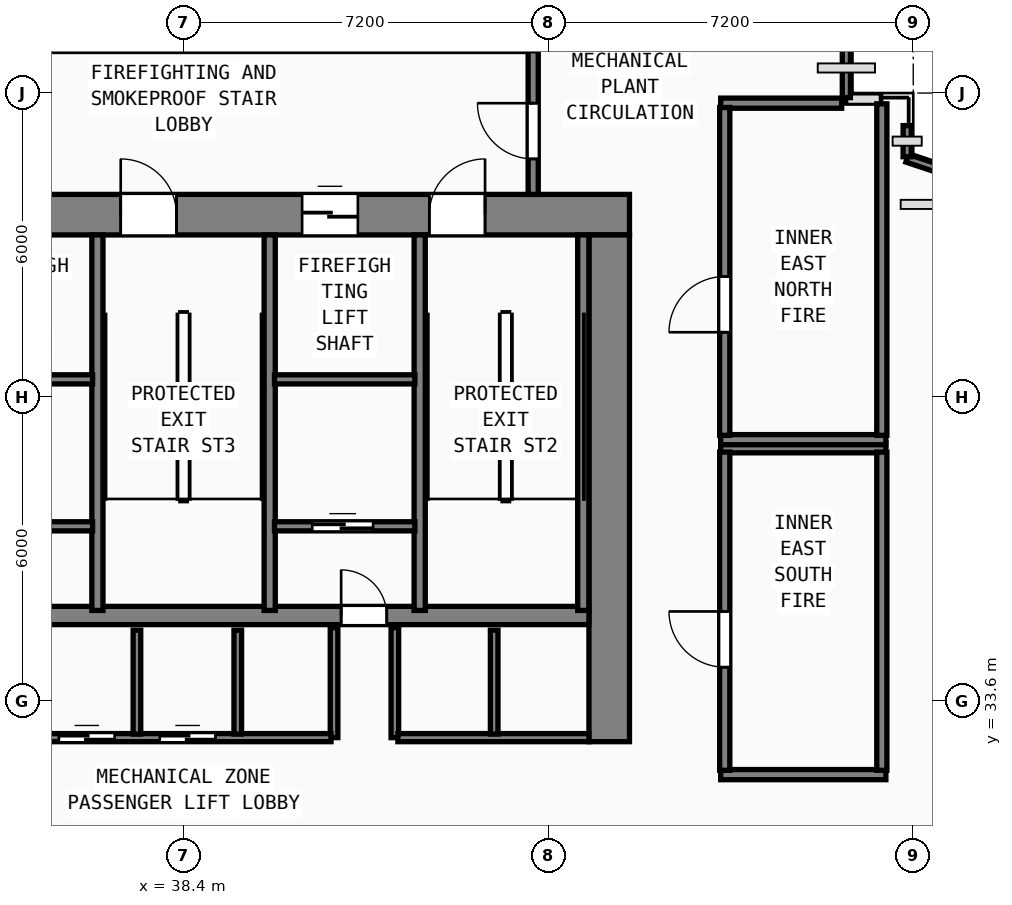
"""IFC4 building model, lengths in metres.
Left out: names, types, materials, properties, quantities, classifications, styles, units other than length and angle.
Written with IfcOpenShell. Run it as: python <this file> out.ifc"""

import sys

from ifc_helpers import new_model, si_unit, direction, frame, frame_2d, origin, origin_2d, place, context, subcontext, project, spatial, rectangle, hollow_rectangle, extrude, element, fill, save


model = new_model("IFC4")
c1 = context("Model", 3, precision=1e-05, world=origin(), true_north=direction((0.0, 1.0)))
c2 = subcontext(c1, "Body", "Model", "MODEL_VIEW")
j1 = project(units=[si_unit("LENGTHUNIT", "METRE"), si_unit("PLANEANGLEUNIT", "RADIAN")], contexts=[c1])
p1 = place(None, origin())
s1 = spatial("IfcSite", under=j1, at=p1, CompositionType="ELEMENT")
p2 = place(p1, origin())
s2 = spatial("IfcBuilding", under=s1, at=p2, CompositionType="ELEMENT")
p3 = place(p2, frame((0.0, 0.0, 43.0)))
s3 = spatial("IfcBuildingStorey", under=s2, at=p3, CompositionType="ELEMENT", Elevation=43.0)
p4 = place(p3, frame((29.6, 43.2, 0.0), z_axis=(0.0, 0.0, 1.0), x_axis=(1.0, 0.0, 0.0)))
e1 = element("IfcWall", 1, at=p4, inside=s3, PredefinedType="SHEAR", context=c2, shape_type="SweptSolid", body=[
    extrude(rectangle(XDim=17.6, YDim=0.8, at=frame_2d((8.8, 0.0))), origin(), (0.0, 0.0, 1.0), 4.4),
])
p5 = place(p4, frame((2.45, 0.0, 0.0)))
e2 = element("IfcOpeningElement", 2, at=p5, cuts=e1, PredefinedType="OPENING", context=c2, shape_type="SweptSolid", body=[
    extrude(rectangle(XDim=1.1, YDim=2.15, at=frame_2d((0.55, 1.075))), frame((0.0, 0.41, 0.0), z_axis=(0.0, -1.0, 0.0), x_axis=(1.0, 0.0, 0.0)), (0.0, 0.0, 1.0), 0.82),
])
p6 = place(p4, frame((7.56, 0.0, 0.0)))
e3 = element("IfcOpeningElement", 3, at=p6, cuts=e1, PredefinedType="OPENING", context=c2, shape_type="SweptSolid", body=[
    extrude(rectangle(XDim=1.1, YDim=2.15, at=frame_2d((0.55, 1.075))), frame((0.0, 0.41, 0.0), z_axis=(0.0, -1.0, 0.0), x_axis=(1.0, 0.0, 0.0)), (0.0, 0.0, 1.0), 0.82),
])
p7 = place(p4, frame((13.65, 0.0, 0.0)))
e4 = element("IfcOpeningElement", 4, at=p7, cuts=e1, PredefinedType="OPENING", context=c2, shape_type="SweptSolid", body=[
    extrude(rectangle(XDim=1.1, YDim=2.15, at=frame_2d((0.55, 1.075))), frame((0.0, 0.41, 0.0), z_axis=(0.0, -1.0, 0.0), x_axis=(1.0, 0.0, 0.0)), (0.0, 0.0, 1.0), 0.82),
])
p8 = place(p4, frame((4.78, 0.0, 0.0)))
e5 = element("IfcOpeningElement", 5, at=p8, cuts=e1, PredefinedType="OPENING", context=c2, shape_type="SweptSolid", body=[
    extrude(rectangle(XDim=1.1, YDim=2.2, at=frame_2d((0.55, 1.1))), frame((0.0, 0.41, 0.0), z_axis=(0.0, -1.0, 0.0), x_axis=(1.0, 0.0, 0.0)), (0.0, 0.0, 1.0), 0.82),
])
p9 = place(p4, frame((11.14, 0.0, 0.0)))
e6 = element("IfcOpeningElement", 6, at=p9, cuts=e1, PredefinedType="OPENING", context=c2, shape_type="SweptSolid", body=[
    extrude(rectangle(XDim=1.1, YDim=2.2, at=frame_2d((0.55, 1.1))), frame((0.0, 0.41, 0.0), z_axis=(0.0, -1.0, 0.0), x_axis=(1.0, 0.0, 0.0)), (0.0, 0.0, 1.0), 0.82),
])
p10 = place(p3, frame((46.8, 32.8, 0.0), z_axis=(0.0, 0.0, 1.0), x_axis=(0.0, 1.0, 0.0)))
e7 = element("IfcWall", 7, at=p10, inside=s3, PredefinedType="SHEAR", context=c2, shape_type="SweptSolid", body=[
    extrude(rectangle(XDim=10.0, YDim=0.8, at=frame_2d((5.0, 0.0))), origin(), (0.0, 0.0, 1.0), 4.4),
])
p11 = place(p3, frame((30.4, 35.29, 0.0), z_axis=(0.0, 0.0, 1.0), x_axis=(1.0, 0.0, 0.0)))
e8 = element("IfcWall", 8, at=p11, inside=s3, PredefinedType="SHEAR", context=c2, shape_type="SweptSolid", body=[
    extrude(rectangle(XDim=16.0, YDim=0.36, at=frame_2d((8.0, 0.0))), origin(), (0.0, 0.0, 1.0), 4.4),
])
p12 = place(p11, frame((4.95, 0.0, 0.0), z_axis=(0.0, 0.0, 1.0), x_axis=(-1.0, 0.0, 0.0)))
e9 = element("IfcOpeningElement", 9, at=p12, cuts=e8, PredefinedType="OPENING", context=c2, shape_type="SweptSolid", body=[
    extrude(rectangle(XDim=0.9, YDim=2.1, at=frame_2d((0.45, 1.05))), frame((0.0, 0.19, 0.0), z_axis=(0.0, -1.0, 0.0), x_axis=(1.0, 0.0, 0.0)), (0.0, 0.0, 1.0), 0.38),
])
p13 = place(p11, frame((12.01, 0.0, 0.0), z_axis=(0.0, 0.0, 1.0), x_axis=(-1.0, 0.0, 0.0)))
e10 = element("IfcOpeningElement", 10, at=p13, cuts=e8, PredefinedType="OPENING", context=c2, shape_type="SweptSolid", body=[
    extrude(rectangle(XDim=0.9, YDim=2.1, at=frame_2d((0.45, 1.05))), frame((0.0, 0.19, 0.0), z_axis=(0.0, -1.0, 0.0), x_axis=(1.0, 0.0, 0.0)), (0.0, 0.0, 1.0), 0.38),
])
for number, where, z_axis, x_axis in (
    (11, (36.7, 35.39, 0.0), (0.0, 0.0, 1.0), (0.0, 1.0, 0.0)),
    (12, (40.1, 35.39, 0.0), (0.0, 0.0, 1.0), (0.0, 1.0, 0.0)),
    (13, (43.06, 35.39, 0.0), (0.0, 0.0, 1.0), (0.0, 1.0, 0.0)),
    (14, (46.288, 35.39, 0.0), (0.0, 0.0, 1.0), (0.0, 1.0, 0.0)),
):
    element("IfcWall", number, at=place(p3, frame(where, z_axis=z_axis, x_axis=x_axis)), inside=s3, PredefinedType="SHEAR", context=c2, shape_type="SweptSolid", body=[
        extrude(rectangle(XDim=7.41, YDim=0.22, at=frame_2d((3.705, 0.0))), origin(), (0.0, 0.0, 1.0), 4.4),
    ])
for number, where, z_axis, x_axis in (
    (15, (52.8, 33.6, 0.0), (0.0, 0.0, 1.0), (1.0, 0.0, 0.0)),
    (16, (52.8, 45.6, 0.0), (0.0, 0.0, 1.0), (1.0, 0.0, 0.0)),
):
    element("IfcColumn", number, at=place(p3, frame(where, z_axis=z_axis, x_axis=x_axis)), inside=s3, PredefinedType="COLUMN", context=c2, shape_type="SweptSolid", body=[
        extrude(hollow_rectangle(XDim=1.3, YDim=1.3, WallThickness=0.048, at=origin_2d()), origin(), (0.0, 0.0, 1.0), 4.6),
    ])
p14 = place(p3, frame((52.8, 39.6, 0.0), z_axis=(0.0, 0.0, 1.0), x_axis=(1.0, 0.0, 0.0)))
e17 = element("IfcColumn", 17, at=p14, inside=s3, PredefinedType="COLUMN", context=c2, shape_type="SweptSolid", body=[
    extrude(hollow_rectangle(XDim=1.0, YDim=1.0, WallThickness=0.038, at=origin_2d()), origin(), (0.0, 0.0, 1.0), 4.6),
])
p15 = place(p3, frame((58.145, 42.492, 0.0), z_axis=(0.0, 0.0, 1.0), x_axis=(-0.948683298051, 0.316227766017, 0.0)))
e18 = element("IfcWall", 18, at=p15, inside=s3, PredefinedType="PARAPET", context=c2, shape_type="SweptSolid", body=[
    extrude(rectangle(XDim=5.76, YDim=0.16, at=frame_2d((2.88, 0.0))), origin(), (0.0, 0.0, 1.0), 1.15),
])
p16 = place(p3, frame((52.68, 44.344, 0.0), z_axis=(0.0, 0.0, 1.0), x_axis=(0.0, 1.0, 0.0)))
e19 = element("IfcWall", 19, at=p16, inside=s3, PredefinedType="PARAPET", context=c2, shape_type="SweptSolid", body=[
    extrude(rectangle(XDim=0.615, YDim=0.16, at=frame_2d((0.307, 0.0))), origin(), (0.0, 0.0, 1.0), 1.15),
])
p17 = place(p3, frame((52.158, 45.48, 0.0), z_axis=(0.0, 0.0, 1.0), x_axis=(-1.0, 0.0, 0.0)))
e20 = element("IfcWall", 20, at=p17, inside=s3, PredefinedType="PARAPET", context=c2, shape_type="SweptSolid", body=[
    extrude(rectangle(XDim=0.678, YDim=0.16, at=frame_2d((0.339, 0.0))), origin(), (0.0, 0.0, 1.0), 1.15),
])
p18 = place(p3, frame((51.48, 45.51, 0.0), z_axis=(0.0, 0.0, 1.0), x_axis=(0.0, 1.0, 0.0)))
e21 = element("IfcWall", 21, at=p18, inside=s3, PredefinedType="PARAPET", context=c2, shape_type="SweptSolid", body=[
    extrude(rectangle(XDim=1.17, YDim=0.16, at=frame_2d((0.585, 0.0))), origin(), (0.0, 0.0, 1.0), 1.15),
])
p19 = place(p3, frame((45.3, 43.6, 0.0), z_axis=(0.0, 0.0, 1.0), x_axis=(0.0, 1.0, 0.0)))
e22 = element("IfcWall", 22, at=p19, inside=s3, PredefinedType="SOLIDWALL", context=c2, shape_type="SweptSolid", body=[
    extrude(rectangle(XDim=2.835, YDim=0.2, at=frame_2d((1.417, 0.0))), origin(), (0.0, 0.0, 1.0), 4.4),
])
p20 = place(p19, frame((0.7, 0.0, 0.0)))
e23 = element("IfcOpeningElement", 23, at=p20, cuts=e22, PredefinedType="OPENING", context=c2, shape_type="SweptSolid", body=[
    extrude(rectangle(XDim=1.1, YDim=2.15, at=frame_2d((0.55, 1.075))), frame((0.0, 0.11, 0.0), z_axis=(0.0, -1.0, 0.0), x_axis=(1.0, 0.0, 0.0)), (0.0, 0.0, 1.0), 0.22),
])
for number, where, z_axis, x_axis in (
    (24, (33.835, 39.95, 0.0), (0.0, 0.0, 1.0), (1.0, 0.0, 0.0)),
    (25, (40.195, 39.95, 0.0), (0.0, 0.0, 1.0), (1.0, 0.0, 0.0)),
):
    element("IfcWall", number, at=place(p3, frame(where, z_axis=z_axis, x_axis=x_axis)), inside=s3, PredefinedType="SOLIDWALL", context=c2, shape_type="SweptSolid", body=[
        extrude(rectangle(XDim=2.77, YDim=0.18, at=frame_2d((1.385, 0.0))), origin(), (0.0, 0.0, 1.0), 4.4),
    ])
p21 = place(p3, frame((33.835, 37.05, 0.0), z_axis=(0.0, 0.0, 1.0), x_axis=(1.0, 0.0, 0.0)))
e26 = element("IfcWall", 26, at=p21, inside=s3, PredefinedType="SOLIDWALL", context=c2, shape_type="SweptSolid", body=[
    extrude(rectangle(XDim=2.77, YDim=0.18, at=frame_2d((1.385, 0.0))), origin(), (0.0, 0.0, 1.0), 4.4),
])
p22 = place(p21, frame((1.945, 0.0, 0.0), z_axis=(0.0, 0.0, 1.0), x_axis=(-1.0, 0.0, 0.0)))
e27 = element("IfcOpeningElement", 27, at=p22, cuts=e26, PredefinedType="OPENING", context=c2, shape_type="SweptSolid", body=[
    extrude(rectangle(XDim=1.2, YDim=2.2, at=frame_2d((0.6, 1.1))), frame((0.0, 0.1, 0.0), z_axis=(0.0, -1.0, 0.0), x_axis=(1.0, 0.0, 0.0)), (0.0, 0.0, 1.0), 0.2),
])
p23 = place(p3, frame((40.195, 37.05, 0.0), z_axis=(0.0, 0.0, 1.0), x_axis=(1.0, 0.0, 0.0)))
e28 = element("IfcWall", 28, at=p23, inside=s3, PredefinedType="SOLIDWALL", context=c2, shape_type="SweptSolid", body=[
    extrude(rectangle(XDim=2.77, YDim=0.18, at=frame_2d((1.385, 0.0))), origin(), (0.0, 0.0, 1.0), 4.4),
])
p24 = place(p23, frame((1.945, 0.0, 0.0), z_axis=(0.0, 0.0, 1.0), x_axis=(-1.0, 0.0, 0.0)))
e29 = element("IfcOpeningElement", 29, at=p24, cuts=e28, PredefinedType="OPENING", context=c2, shape_type="SweptSolid", body=[
    extrude(rectangle(XDim=1.2, YDim=2.2, at=frame_2d((0.6, 1.1))), frame((0.0, 0.1, 0.0), z_axis=(0.0, -1.0, 0.0), x_axis=(1.0, 0.0, 0.0)), (0.0, 0.0, 1.0), 0.2),
])
for number, where, z_axis, x_axis in (
    (30, (41.37, 32.88, 0.0), (0.0, 0.0, 1.0), (0.0, 1.0, 0.0)),
    (31, (42.57, 32.88, 0.0), (0.0, 0.0, 1.0), (0.0, 1.0, 0.0)),
):
    element("IfcWall", number, at=place(p3, frame(where, z_axis=z_axis, x_axis=x_axis)), inside=s3, PredefinedType="SOLIDWALL", context=c2, shape_type="SweptSolid", body=[
        extrude(rectangle(XDim=2.17, YDim=0.15, at=frame_2d((1.085, 0.0))), origin(), (0.0, 0.0, 1.0), 4.4),
    ])
p25 = place(p3, frame((35.57, 32.88, 0.0), z_axis=(0.0, 0.0, 1.0), x_axis=(1.0, 0.0, 0.0)))
e32 = element("IfcWall", 32, at=p25, inside=s3, PredefinedType="SOLIDWALL", context=c2, shape_type="SweptSolid", body=[
    extrude(rectangle(XDim=5.74, YDim=0.16, at=frame_2d((2.87, 0.0))), origin(), (0.0, 0.0, 1.0), 4.4),
])
p26 = place(p25, frame((1.47, 0.0, 0.0), z_axis=(0.0, 0.0, 1.0), x_axis=(-1.0, 0.0, 0.0)))
e33 = element("IfcOpeningElement", 33, at=p26, cuts=e32, PredefinedType="OPENING", context=c2, shape_type="SweptSolid", body=[
    extrude(rectangle(XDim=1.1, YDim=2.2, at=frame_2d((0.55, 1.1))), frame((0.0, 0.09, 0.0), z_axis=(0.0, -1.0, 0.0), x_axis=(1.0, 0.0, 0.0)), (0.0, 0.0, 1.0), 0.18),
])
p27 = place(p25, frame((3.46, 0.0, 0.0), z_axis=(0.0, 0.0, 1.0), x_axis=(-1.0, 0.0, 0.0)))
e34 = element("IfcOpeningElement", 34, at=p27, cuts=e32, PredefinedType="OPENING", context=c2, shape_type="SweptSolid", body=[
    extrude(rectangle(XDim=1.1, YDim=2.2, at=frame_2d((0.55, 1.1))), frame((0.0, 0.09, 0.0), z_axis=(0.0, -1.0, 0.0), x_axis=(1.0, 0.0, 0.0)), (0.0, 0.0, 1.0), 0.18),
])
p28 = place(p3, frame((42.63, 32.88, 0.0), z_axis=(0.0, 0.0, 1.0), x_axis=(1.0, 0.0, 0.0)))
e35 = element("IfcWall", 35, at=p28, inside=s3, PredefinedType="SOLIDWALL", context=c2, shape_type="SweptSolid", body=[
    extrude(rectangle(XDim=3.77, YDim=0.16, at=frame_2d((1.885, 0.0))), origin(), (0.0, 0.0, 1.0), 4.4),
])
for number, where, z_axis, x_axis in (
    (36, (37.48, 32.95, 0.0), (0.0, 0.0, 1.0), (0.0, 1.0, 0.0)),
    (37, (39.47, 32.95, 0.0), (0.0, 0.0, 1.0), (0.0, 1.0, 0.0)),
    (38, (44.53, 32.95, 0.0), (0.0, 0.0, 1.0), (0.0, 1.0, 0.0)),
):
    element("IfcWall", number, at=place(p3, frame(where, z_axis=z_axis, x_axis=x_axis)), inside=s3, PredefinedType="SOLIDWALL", context=c2, shape_type="SweptSolid", body=[
        extrude(rectangle(XDim=2.05, YDim=0.15, at=frame_2d((1.025, 0.0))), origin(), (0.0, 0.0, 1.0), 4.4),
    ])
for number, where, z_axis, x_axis in (
    (39, (49.0, 38.6, 0.0), (0.0, 0.0, 1.0), (1.0, 0.0, 0.0)),
    (40, (49.0, 32.15, 0.0), (0.0, 0.0, 1.0), (1.0, 0.0, 0.0)),
):
    element("IfcWall", number, at=place(p3, frame(where, z_axis=z_axis, x_axis=x_axis)), inside=s3, PredefinedType="SOLIDWALL", context=c2, shape_type="SweptSolid", body=[
        extrude(rectangle(XDim=3.26, YDim=0.2, at=frame_2d((1.63, 0.0))), origin(), (0.0, 0.0, 1.0), 4.4),
    ])
p29 = place(p3, frame((49.08, 32.235, 0.0), z_axis=(0.0, 0.0, 1.0), x_axis=(0.0, 1.0, 0.0)))
e41 = element("IfcWall", 41, at=p29, inside=s3, PredefinedType="SOLIDWALL", context=c2, shape_type="SweptSolid", body=[
    extrude(rectangle(XDim=6.28, YDim=0.2, at=frame_2d((3.14, 0.0))), origin(), (0.0, 0.0, 1.0), 4.4),
])
p30 = place(p29, frame((2.035, 0.0, 0.0)))
e42 = element("IfcOpeningElement", 42, at=p30, cuts=e41, PredefinedType="OPENING", context=c2, shape_type="SweptSolid", body=[
    extrude(rectangle(XDim=1.1, YDim=2.15, at=frame_2d((0.55, 1.075))), frame((0.0, 0.11, 0.0), z_axis=(0.0, -1.0, 0.0), x_axis=(1.0, 0.0, 0.0)), (0.0, 0.0, 1.0), 0.22),
])
p31 = place(p3, frame((52.18, 32.235, 0.0), z_axis=(0.0, 0.0, 1.0), x_axis=(0.0, 1.0, 0.0)))
e43 = element("IfcWall", 43, at=p31, inside=s3, PredefinedType="SOLIDWALL", context=c2, shape_type="SweptSolid", body=[
    extrude(rectangle(XDim=6.28, YDim=0.2, at=frame_2d((3.14, 0.0))), origin(), (0.0, 0.0, 1.0), 4.4),
])
p32 = place(p3, frame((49.0, 45.4, 0.0), z_axis=(0.0, 0.0, 1.0), x_axis=(1.0, 0.0, 0.0)))
e44 = element("IfcWall", 44, at=p32, inside=s3, PredefinedType="SOLIDWALL", context=c2, shape_type="SweptSolid", body=[
    extrude(rectangle(XDim=2.388, YDim=0.2, at=frame_2d((1.194, 0.0))), origin(), (0.0, 0.0, 1.0), 4.4),
])
p33 = place(p3, frame((49.0, 38.76, 0.0), z_axis=(0.0, 0.0, 1.0), x_axis=(1.0, 0.0, 0.0)))
e45 = element("IfcWall", 45, at=p33, inside=s3, PredefinedType="SOLIDWALL", context=c2, shape_type="SweptSolid", body=[
    extrude(rectangle(XDim=3.26, YDim=0.2, at=frame_2d((1.63, 0.0))), origin(), (0.0, 0.0, 1.0), 4.4),
])
p34 = place(p3, frame((49.08, 38.845, 0.0), z_axis=(0.0, 0.0, 1.0), x_axis=(0.0, 1.0, 0.0)))
e46 = element("IfcWall", 46, at=p34, inside=s3, PredefinedType="SOLIDWALL", context=c2, shape_type="SweptSolid", body=[
    extrude(rectangle(XDim=6.47, YDim=0.2, at=frame_2d((3.235, 0.0))), origin(), (0.0, 0.0, 1.0), 4.4),
])
p35 = place(p34, frame((2.035, 0.0, 0.0)))
e47 = element("IfcOpeningElement", 47, at=p35, cuts=e46, PredefinedType="OPENING", context=c2, shape_type="SweptSolid", body=[
    extrude(rectangle(XDim=1.1, YDim=2.15, at=frame_2d((0.55, 1.075))), frame((0.0, 0.11, 0.0), z_axis=(0.0, -1.0, 0.0), x_axis=(1.0, 0.0, 0.0)), (0.0, 0.0, 1.0), 0.22),
])
p36 = place(p3, frame((52.18, 38.845, 0.0), z_axis=(0.0, 0.0, 1.0), x_axis=(0.0, 1.0, 0.0)))
e48 = element("IfcWall", 48, at=p36, inside=s3, PredefinedType="SOLIDWALL", context=c2, shape_type="SweptSolid", body=[
    extrude(rectangle(XDim=6.543, YDim=0.2, at=frame_2d((3.271, 0.0))), origin(), (0.0, 0.0, 1.0), 4.4),
])
p37 = place(p6, origin())
e49 = element("IfcDoor", 49, at=p37, inside=s3, OperationType="SINGLE_SWING_LEFT", PredefinedType="DOOR", context=c2, shape_type="SweptSolid", body=[
    extrude(rectangle(XDim=1.1, YDim=2.15, at=frame_2d((0.55, 1.075))), frame((0.0, 0.185, 0.0), z_axis=(0.0, -1.0, 0.0), x_axis=(1.0, 0.0, 0.0)), (0.0, 0.0, 1.0), 0.05),
])
fill(e3, e49)
p38 = place(p7, origin())
e50 = element("IfcDoor", 50, at=p38, inside=s3, OperationType="SINGLE_SWING_RIGHT", PredefinedType="DOOR", context=c2, shape_type="SweptSolid", body=[
    extrude(rectangle(XDim=1.1, YDim=2.15, at=frame_2d((0.55, 1.075))), frame((0.0, 0.185, 0.0), z_axis=(0.0, -1.0, 0.0), x_axis=(1.0, 0.0, 0.0)), (0.0, 0.0, 1.0), 0.05),
])
fill(e4, e50)
p39 = place(p20, origin())
e51 = element("IfcDoor", 51, at=p39, inside=s3, OperationType="SINGLE_SWING_RIGHT", PredefinedType="DOOR", context=c2, shape_type="SweptSolid", body=[
    extrude(rectangle(XDim=1.1, YDim=2.15, at=frame_2d((0.55, 1.075))), frame((0.0, 0.025, 0.0), z_axis=(0.0, -1.0, 0.0), x_axis=(1.0, 0.0, 0.0)), (0.0, 0.0, 1.0), 0.05),
])
fill(e23, e51)
p40 = place(p9, origin())
e52 = element("IfcDoor", 52, at=p40, inside=s3, OperationType="SLIDING_TO_LEFT", PredefinedType="DOOR", context=c2, shape_type="SweptSolid", body=[
    extrude(rectangle(XDim=1.1, YDim=2.2, at=frame_2d((0.55, 1.1))), frame((0.0, 0.185, 0.0), z_axis=(0.0, -1.0, 0.0), x_axis=(1.0, 0.0, 0.0)), (0.0, 0.0, 1.0), 0.05),
])
fill(e6, e52)
p41 = place(p24, origin())
e53 = element("IfcDoor", 53, at=p41, inside=s3, OperationType="SLIDING_TO_RIGHT", PredefinedType="DOOR", context=c2, shape_type="SweptSolid", body=[
    extrude(rectangle(XDim=1.2, YDim=2.2, at=frame_2d((0.6, 1.1))), frame((0.0, 0.025, 0.0), z_axis=(0.0, -1.0, 0.0), x_axis=(1.0, 0.0, 0.0)), (0.0, 0.0, 1.0), 0.05),
])
fill(e29, e53)
p42 = place(p13, origin())
e54 = element("IfcDoor", 54, at=p42, inside=s3, OperationType="SINGLE_SWING_RIGHT", PredefinedType="DOOR", context=c2, shape_type="SweptSolid", body=[
    extrude(rectangle(XDim=0.9, YDim=2.1, at=frame_2d((0.45, 1.05))), frame((0.0, 0.025, 0.0), z_axis=(0.0, -1.0, 0.0), x_axis=(1.0, 0.0, 0.0)), (0.0, 0.0, 1.0), 0.05),
])
fill(e10, e54)
p43 = place(p26, origin())
e55 = element("IfcDoor", 55, at=p43, inside=s3, OperationType="SLIDING_TO_LEFT", PredefinedType="DOOR", context=c2, shape_type="SweptSolid", body=[
    extrude(rectangle(XDim=1.1, YDim=2.2, at=frame_2d((0.55, 1.1))), frame((0.0, 0.025, 0.0), z_axis=(0.0, -1.0, 0.0), x_axis=(1.0, 0.0, 0.0)), (0.0, 0.0, 1.0), 0.05),
])
fill(e33, e55)
p44 = place(p27, origin())
e56 = element("IfcDoor", 56, at=p44, inside=s3, OperationType="SLIDING_TO_LEFT", PredefinedType="DOOR", context=c2, shape_type="SweptSolid", body=[
    extrude(rectangle(XDim=1.1, YDim=2.2, at=frame_2d((0.55, 1.1))), frame((0.0, 0.025, 0.0), z_axis=(0.0, -1.0, 0.0), x_axis=(1.0, 0.0, 0.0)), (0.0, 0.0, 1.0), 0.05),
])
fill(e34, e56)
p45 = place(p30, origin())
e57 = element("IfcDoor", 57, at=p45, inside=s3, OperationType="SINGLE_SWING_RIGHT", PredefinedType="DOOR", context=c2, shape_type="SweptSolid", body=[
    extrude(rectangle(XDim=1.1, YDim=2.15, at=frame_2d((0.55, 1.075))), frame((0.0, 0.025, 0.0), z_axis=(0.0, -1.0, 0.0), x_axis=(1.0, 0.0, 0.0)), (0.0, 0.0, 1.0), 0.05),
])
fill(e42, e57)
p46 = place(p35, origin())
e58 = element("IfcDoor", 58, at=p46, inside=s3, OperationType="SINGLE_SWING_LEFT", PredefinedType="DOOR", context=c2, shape_type="SweptSolid", body=[
    extrude(rectangle(XDim=1.1, YDim=2.15, at=frame_2d((0.55, 1.075))), frame((0.0, 0.025, 0.0), z_axis=(0.0, -1.0, 0.0), x_axis=(1.0, 0.0, 0.0)), (0.0, 0.0, 1.0), 0.05),
])
fill(e47, e58)
save(model, sys.argv[1])
